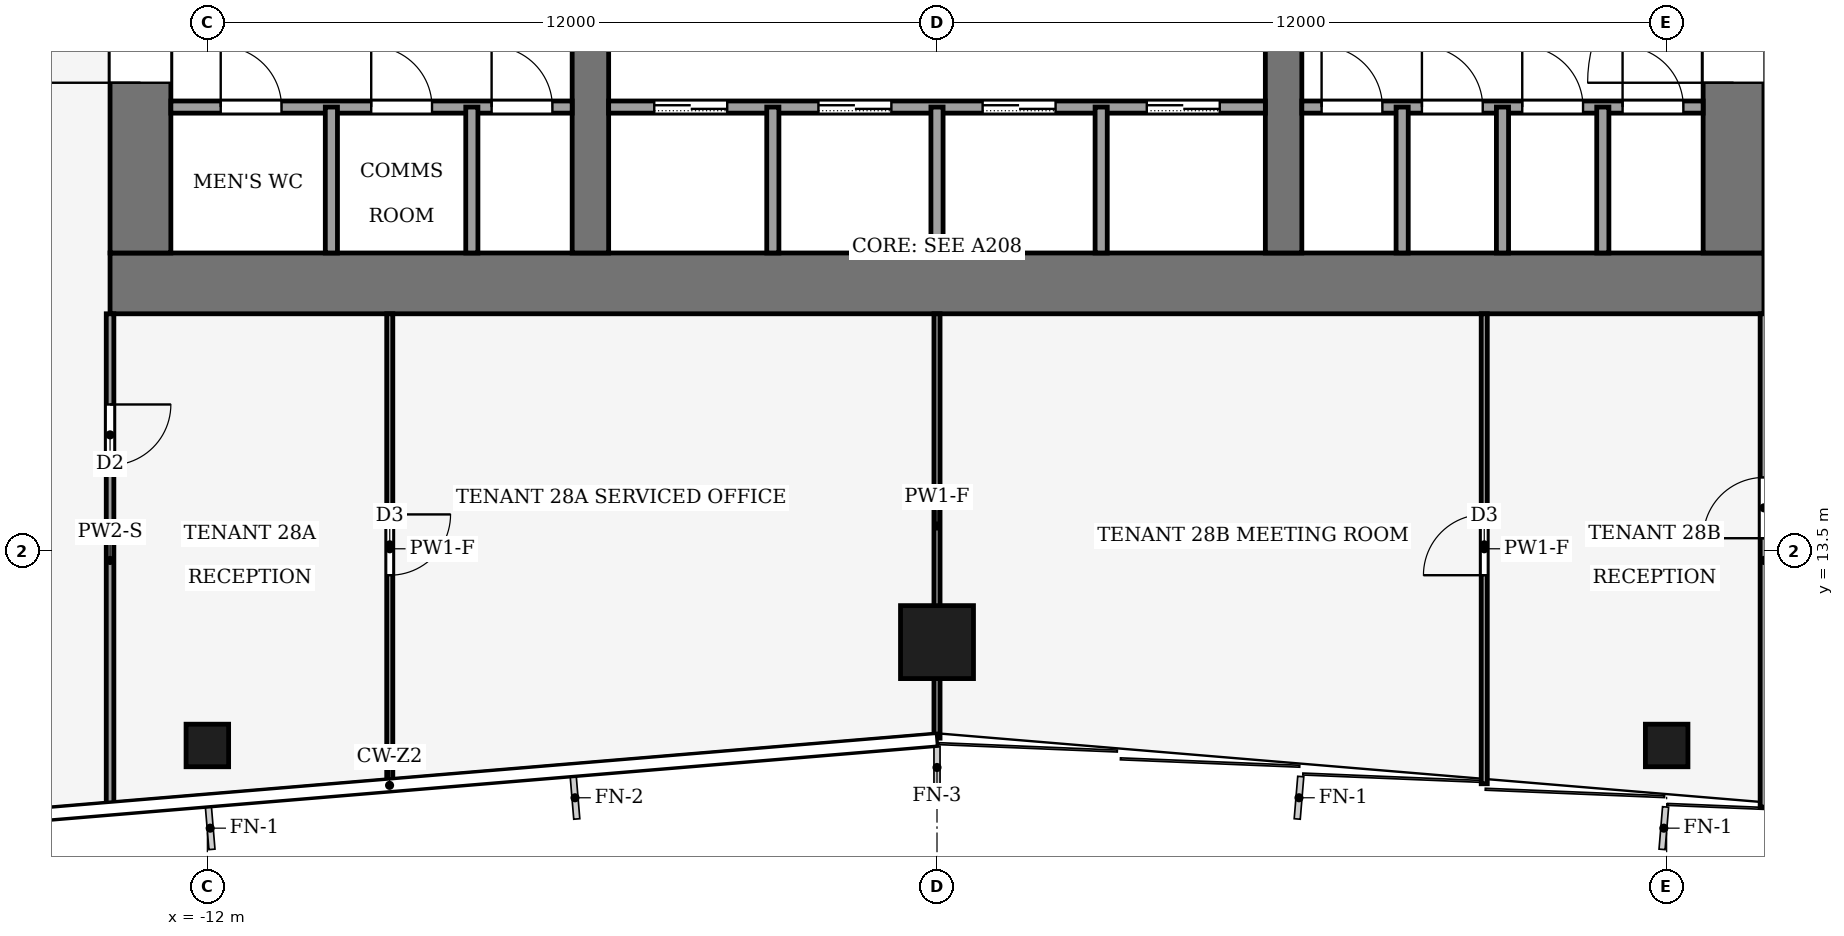
"""IFC4 building model, lengths in metres.
Left out: names, types, materials, properties, quantities, classifications, styles, units other than length and angle.
Written with IfcOpenShell. Run it as: python <this file> out.ifc"""

import sys

from ifc_helpers import new_model, si_unit, direction, frame, frame_2d, origin, origin_2d, place, context, subcontext, project, spatial, rectangle, hollow_rectangle, extrude, element, fill, save


model = new_model("IFC4")
c1 = context("Model", 3, precision=1e-05, world=origin(), true_north=direction((0.0, 1.0)))
c2 = subcontext(c1, "Body", "Model", "MODEL_VIEW")
j1 = project(units=[si_unit("LENGTHUNIT", "METRE"), si_unit("PLANEANGLEUNIT", "RADIAN")], contexts=[c1])
p1 = place(None, origin())
s1 = spatial("IfcSite", under=j1, at=p1, CompositionType="ELEMENT")
p2 = place(p1, origin())
s2 = spatial("IfcBuilding", under=s1, at=p2, CompositionType="ELEMENT")
p3 = place(p2, frame((0.0, 0.0, 126.0)))
s3 = spatial("IfcBuildingStorey", under=s2, at=p3, CompositionType="ELEMENT", Elevation=126.0)
p4 = place(p3, frame((-13.6, 17.9, -0.13), z_axis=(0.0, 0.0, 1.0), x_axis=(1.0, 0.0, 0.0)))
e1 = element("IfcWall", 1, at=p4, inside=s3, PredefinedType="SHEAR", context=c2, shape_type="SweptSolid", body=[
    extrude(rectangle(XDim=27.2, YDim=1.0, at=frame_2d((13.6, 0.0))), origin(), (0.0, 0.0, 1.0), 4.0),
])
p5 = place(p3, frame((-13.1, 18.4, -0.13), z_axis=(0.0, 0.0, 1.0), x_axis=(0.0, 1.0, 0.0)))
e2 = element("IfcWall", 2, at=p5, inside=s3, PredefinedType="SHEAR", context=c2, shape_type="SweptSolid", body=[
    extrude(rectangle(XDim=19.2, YDim=1.0, at=frame_2d((9.6, 0.0))), origin(), (0.0, 0.0, 1.0), 4.0),
])
p6 = place(p5, frame((2.8, 0.0, 0.13)))
e3 = element("IfcOpeningElement", 3, at=p6, cuts=e2, PredefinedType="OPENING", context=c2, shape_type="SweptSolid", body=[
    extrude(rectangle(XDim=2.4, YDim=2.4, at=frame_2d((1.2, 1.2))), frame((0.0, 0.51, 0.0), z_axis=(0.0, -1.0, 0.0), x_axis=(1.0, 0.0, 0.0)), (0.0, 0.0, 1.0), 1.02),
])
p7 = place(p5, frame((13.4, 0.0, 0.13)))
e4 = element("IfcOpeningElement", 4, at=p7, cuts=e2, PredefinedType="OPENING", context=c2, shape_type="SweptSolid", body=[
    extrude(rectangle(XDim=1.4, YDim=2.2, at=frame_2d((0.7, 1.1))), frame((0.0, 0.51, 0.0), z_axis=(0.0, -1.0, 0.0), x_axis=(1.0, 0.0, 0.0)), (0.0, 0.0, 1.0), 1.02),
])
p8 = place(p3, frame((13.1, 18.4, -0.13), z_axis=(0.0, 0.0, 1.0), x_axis=(0.0, 1.0, 0.0)))
e5 = element("IfcWall", 5, at=p8, inside=s3, PredefinedType="SHEAR", context=c2, shape_type="SweptSolid", body=[
    extrude(rectangle(XDim=19.2, YDim=1.0, at=frame_2d((9.6, 0.0))), origin(), (0.0, 0.0, 1.0), 4.0),
])
p9 = place(p8, frame((2.8, 0.0, 0.13)))
e6 = element("IfcOpeningElement", 6, at=p9, cuts=e5, PredefinedType="OPENING", context=c2, shape_type="SweptSolid", body=[
    extrude(rectangle(XDim=2.4, YDim=2.4, at=frame_2d((1.2, 1.2))), frame((0.0, 0.51, 0.0), z_axis=(0.0, -1.0, 0.0), x_axis=(1.0, 0.0, 0.0)), (0.0, 0.0, 1.0), 1.02),
])
p10 = place(p8, frame((13.3, 0.0, 0.13)))
e7 = element("IfcOpeningElement", 7, at=p10, cuts=e5, PredefinedType="OPENING", context=c2, shape_type="SweptSolid", body=[
    extrude(rectangle(XDim=2.4, YDim=2.4, at=frame_2d((1.2, 1.2))), frame((0.0, 0.51, 0.0), z_axis=(0.0, -1.0, 0.0), x_axis=(1.0, 0.0, 0.0)), (0.0, 0.0, 1.0), 1.02),
])
p11 = place(p3, frame((-5.7, 18.4, -0.13), z_axis=(0.0, 0.0, 1.0), x_axis=(0.0, 1.0, 0.0)))
e8 = element("IfcWall", 8, at=p11, inside=s3, PredefinedType="SHEAR", context=c2, shape_type="SweptSolid", body=[
    extrude(rectangle(XDim=19.2, YDim=0.6, at=frame_2d((9.6, 0.0))), origin(), (0.0, 0.0, 1.0), 4.0),
])
p12 = place(p11, frame((8.35, 0.0, 0.13)))
e9 = element("IfcOpeningElement", 9, at=p12, cuts=e8, PredefinedType="OPENING", context=c2, shape_type="SweptSolid", body=[
    extrude(rectangle(XDim=0.9, YDim=2.1, at=frame_2d((0.45, 1.05))), frame((0.0, 0.31, 0.0), z_axis=(0.0, -1.0, 0.0), x_axis=(1.0, 0.0, 0.0)), (0.0, 0.0, 1.0), 0.62),
])
p13 = place(p3, frame((5.7, 18.4, -0.13), z_axis=(0.0, 0.0, 1.0), x_axis=(0.0, 1.0, 0.0)))
e10 = element("IfcWall", 10, at=p13, inside=s3, PredefinedType="SHEAR", context=c2, shape_type="SweptSolid", body=[
    extrude(rectangle(XDim=19.2, YDim=0.6, at=frame_2d((9.6, 0.0))), origin(), (0.0, 0.0, 1.0), 4.0),
])
p14 = place(p13, frame((13.3, 0.0, 0.13)))
e11 = element("IfcOpeningElement", 11, at=p14, cuts=e10, PredefinedType="OPENING", context=c2, shape_type="SweptSolid", body=[
    extrude(rectangle(XDim=2.4, YDim=2.4, at=frame_2d((1.2, 1.2))), frame((0.0, 0.31, 0.0), z_axis=(0.0, -1.0, 0.0), x_axis=(1.0, 0.0, 0.0)), (0.0, 0.0, 1.0), 0.62),
])
p15 = place(p3, frame((0.0, 12.0, 0.0), z_axis=(0.0, 0.0, 1.0), x_axis=(1.0, 0.0, 0.0)))
e12 = element("IfcColumn", 12, at=p15, inside=s3, PredefinedType="COLUMN", context=c2, shape_type="SweptSolid", body=[
    extrude(hollow_rectangle(XDim=1.2, YDim=1.2, WallThickness=0.07, at=origin_2d()), origin(), (0.0, 0.0, 1.0), 4.0),
])
for number, where, z_axis, x_axis in (
    (13, (-12.0, 10.3, 0.0), (0.0, 0.0, 1.0), (1.0, 0.0, 0.0)),
    (14, (12.0, 10.3, 0.0), (0.0, 0.0, 1.0), (1.0, 0.0, 0.0)),
):
    element("IfcColumn", number, at=place(p3, frame(where, z_axis=z_axis, x_axis=x_axis)), inside=s3, PredefinedType="COLUMN", context=c2, shape_type="SweptSolid", body=[
        extrude(hollow_rectangle(XDim=0.7, YDim=0.7, WallThickness=0.03, at=origin_2d()), origin(), (0.0, 0.0, 1.0), 4.0),
    ])
p16 = place(p3, frame((-12.6, 20.8, 0.0), z_axis=(0.0, 0.0, 1.0), x_axis=(1.0, 0.0, 0.0)))
e15 = element("IfcWall", 15, at=p16, inside=s3, PredefinedType="PARTITIONING", context=c2, shape_type="SweptSolid", body=[
    extrude(rectangle(XDim=6.6, YDim=0.2, at=frame_2d((3.3, 0.0))), origin(), (0.0, 0.0, 1.0), 3.87),
])
p17 = place(p16, frame((0.82, 0.0, 0.0)))
e16 = element("IfcOpeningElement", 16, at=p17, cuts=e15, PredefinedType="OPENING", context=c2, shape_type="SweptSolid", body=[
    extrude(rectangle(XDim=1.0, YDim=2.1, at=frame_2d((0.5, 1.05))), frame((0.0, 0.11, 0.0), z_axis=(0.0, -1.0, 0.0), x_axis=(1.0, 0.0, 0.0)), (0.0, 0.0, 1.0), 0.22),
])
p18 = place(p16, frame((3.295, 0.0, 0.0)))
e17 = element("IfcOpeningElement", 17, at=p18, cuts=e15, PredefinedType="OPENING", context=c2, shape_type="SweptSolid", body=[
    extrude(rectangle(XDim=1.0, YDim=2.1, at=frame_2d((0.5, 1.05))), frame((0.0, 0.11, 0.0), z_axis=(0.0, -1.0, 0.0), x_axis=(1.0, 0.0, 0.0)), (0.0, 0.0, 1.0), 0.22),
])
p19 = place(p16, frame((5.275, 0.0, 0.0)))
e18 = element("IfcOpeningElement", 18, at=p19, cuts=e15, PredefinedType="OPENING", context=c2, shape_type="SweptSolid", body=[
    extrude(rectangle(XDim=1.0, YDim=2.1, at=frame_2d((0.5, 1.05))), frame((0.0, 0.11, 0.0), z_axis=(0.0, -1.0, 0.0), x_axis=(1.0, 0.0, 0.0)), (0.0, 0.0, 1.0), 0.22),
])
p20 = place(p3, frame((-5.4, 20.8, 0.0), z_axis=(0.0, 0.0, 1.0), x_axis=(1.0, 0.0, 0.0)))
e19 = element("IfcWall", 19, at=p20, inside=s3, PredefinedType="PARTITIONING", context=c2, shape_type="SweptSolid", body=[
    extrude(rectangle(XDim=10.8, YDim=0.2, at=frame_2d((5.4, 0.0))), origin(), (0.0, 0.0, 1.0), 3.87),
])
p21 = place(p20, frame((0.75, 0.0, 0.0)))
e20 = element("IfcOpeningElement", 20, at=p21, cuts=e19, PredefinedType="OPENING", context=c2, shape_type="SweptSolid", body=[
    extrude(rectangle(XDim=1.2, YDim=2.2, at=frame_2d((0.6, 1.1))), frame((0.0, 0.11, 0.0), z_axis=(0.0, -1.0, 0.0), x_axis=(1.0, 0.0, 0.0)), (0.0, 0.0, 1.0), 0.22),
])
p22 = place(p20, frame((3.45, 0.0, 0.0)))
e21 = element("IfcOpeningElement", 21, at=p22, cuts=e19, PredefinedType="OPENING", context=c2, shape_type="SweptSolid", body=[
    extrude(rectangle(XDim=1.2, YDim=2.2, at=frame_2d((0.6, 1.1))), frame((0.0, 0.11, 0.0), z_axis=(0.0, -1.0, 0.0), x_axis=(1.0, 0.0, 0.0)), (0.0, 0.0, 1.0), 0.22),
])
p23 = place(p20, frame((6.15, 0.0, 0.0)))
e22 = element("IfcOpeningElement", 22, at=p23, cuts=e19, PredefinedType="OPENING", context=c2, shape_type="SweptSolid", body=[
    extrude(rectangle(XDim=1.2, YDim=2.2, at=frame_2d((0.6, 1.1))), frame((0.0, 0.11, 0.0), z_axis=(0.0, -1.0, 0.0), x_axis=(1.0, 0.0, 0.0)), (0.0, 0.0, 1.0), 0.22),
])
p24 = place(p20, frame((8.85, 0.0, 0.0)))
e23 = element("IfcOpeningElement", 23, at=p24, cuts=e19, PredefinedType="OPENING", context=c2, shape_type="SweptSolid", body=[
    extrude(rectangle(XDim=1.2, YDim=2.2, at=frame_2d((0.6, 1.1))), frame((0.0, 0.11, 0.0), z_axis=(0.0, -1.0, 0.0), x_axis=(1.0, 0.0, 0.0)), (0.0, 0.0, 1.0), 0.22),
])
p25 = place(p3, frame((6.0, 20.8, 0.0), z_axis=(0.0, 0.0, 1.0), x_axis=(1.0, 0.0, 0.0)))
e24 = element("IfcWall", 24, at=p25, inside=s3, PredefinedType="PARTITIONING", context=c2, shape_type="SweptSolid", body=[
    extrude(rectangle(XDim=6.6, YDim=0.2, at=frame_2d((3.3, 0.0))), origin(), (0.0, 0.0, 1.0), 3.87),
])
p26 = place(p25, frame((0.325, 0.0, 0.0)))
e25 = element("IfcOpeningElement", 25, at=p26, cuts=e24, PredefinedType="OPENING", context=c2, shape_type="SweptSolid", body=[
    extrude(rectangle(XDim=1.0, YDim=2.1, at=frame_2d((0.5, 1.05))), frame((0.0, 0.11, 0.0), z_axis=(0.0, -1.0, 0.0), x_axis=(1.0, 0.0, 0.0)), (0.0, 0.0, 1.0), 0.22),
])
p27 = place(p25, frame((1.975, 0.0, 0.0)))
e26 = element("IfcOpeningElement", 26, at=p27, cuts=e24, PredefinedType="OPENING", context=c2, shape_type="SweptSolid", body=[
    extrude(rectangle(XDim=1.0, YDim=2.1, at=frame_2d((0.5, 1.05))), frame((0.0, 0.11, 0.0), z_axis=(0.0, -1.0, 0.0), x_axis=(1.0, 0.0, 0.0)), (0.0, 0.0, 1.0), 0.22),
])
p28 = place(p25, frame((3.625, 0.0, 0.0)))
e27 = element("IfcOpeningElement", 27, at=p28, cuts=e24, PredefinedType="OPENING", context=c2, shape_type="SweptSolid", body=[
    extrude(rectangle(XDim=1.0, YDim=2.1, at=frame_2d((0.5, 1.05))), frame((0.0, 0.11, 0.0), z_axis=(0.0, -1.0, 0.0), x_axis=(1.0, 0.0, 0.0)), (0.0, 0.0, 1.0), 0.22),
])
p29 = place(p25, frame((5.275, 0.0, 0.0)))
e28 = element("IfcOpeningElement", 28, at=p29, cuts=e24, PredefinedType="OPENING", context=c2, shape_type="SweptSolid", body=[
    extrude(rectangle(XDim=1.0, YDim=2.1, at=frame_2d((0.5, 1.05))), frame((0.0, 0.11, 0.0), z_axis=(0.0, -1.0, 0.0), x_axis=(1.0, 0.0, 0.0)), (0.0, 0.0, 1.0), 0.22),
])
for number, where, z_axis, x_axis in (
    (29, (-9.96, 18.4, 0.0), (0.0, 0.0, 1.0), (0.0, 1.0, 0.0)),
    (30, (-7.65, 18.4, 0.0), (0.0, 0.0, 1.0), (0.0, 1.0, 0.0)),
    (31, (-2.7, 18.4, 0.0), (0.0, 0.0, 1.0), (0.0, 1.0, 0.0)),
    (32, (0.0, 18.4, 0.0), (0.0, 0.0, 1.0), (0.0, 1.0, 0.0)),
    (33, (2.7, 18.4, 0.0), (0.0, 0.0, 1.0), (0.0, 1.0, 0.0)),
    (34, (7.65, 18.4, 0.0), (0.0, 0.0, 1.0), (0.0, 1.0, 0.0)),
    (35, (9.3, 18.4, 0.0), (0.0, 0.0, 1.0), (0.0, 1.0, 0.0)),
    (36, (10.95, 18.4, 0.0), (0.0, 0.0, 1.0), (0.0, 1.0, 0.0)),
):
    element("IfcWall", number, at=place(p3, frame(where, z_axis=z_axis, x_axis=x_axis)), inside=s3, PredefinedType="PARTITIONING", context=c2, shape_type="SweptSolid", body=[
        extrude(rectangle(XDim=2.4, YDim=0.2, at=frame_2d((1.2, 0.0))), origin(), (0.0, 0.0, 1.0), 3.87),
    ])
p30 = place(p3, frame((-13.6, 17.4, 0.0), z_axis=(0.0, 0.0, 1.0), x_axis=(0.0, -1.0, 0.0)))
e37 = element("IfcWall", 37, at=p30, inside=s3, PredefinedType="PARTITIONING", context=c2, shape_type="SweptSolid", body=[
    extrude(rectangle(XDim=8.113, YDim=0.125, at=frame_2d((4.057, 0.0))), origin(), (0.0, 0.0, 1.0), 3.04),
])
p31 = place(p30, frame((1.492, 0.0, 0.0)))
e38 = element("IfcOpeningElement", 38, at=p31, cuts=e37, PredefinedType="OPENING", context=c2, shape_type="SweptSolid", body=[
    extrude(rectangle(XDim=1.0, YDim=2.1, at=frame_2d((0.5, 1.05))), frame((0.0, 0.073, 0.0), z_axis=(0.0, -1.0, 0.0), x_axis=(1.0, 0.0, 0.0)), (0.0, 0.0, 1.0), 0.145),
])
p32 = place(p3, frame((13.6, 9.287, 0.0), z_axis=(0.0, 0.0, 1.0), x_axis=(0.0, 1.0, 0.0)))
e39 = element("IfcWall", 39, at=p32, inside=s3, PredefinedType="PARTITIONING", context=c2, shape_type="SweptSolid", body=[
    extrude(rectangle(XDim=8.113, YDim=0.125, at=frame_2d((4.057, 0.0))), origin(), (0.0, 0.0, 1.0), 3.04),
])
p33 = place(p32, frame((4.422, 0.0, 0.0)))
e40 = element("IfcOpeningElement", 40, at=p33, cuts=e39, PredefinedType="OPENING", context=c2, shape_type="SweptSolid", body=[
    extrude(rectangle(XDim=1.0, YDim=2.1, at=frame_2d((0.5, 1.05))), frame((0.0, 0.073, 0.0), z_axis=(0.0, -1.0, 0.0), x_axis=(1.0, 0.0, 0.0)), (0.0, 0.0, 1.0), 0.145),
])
p34 = place(p3, frame((-9.0, 17.4, 0.0), z_axis=(0.0, 0.0, 1.0), x_axis=(0.0, -1.0, 0.0)))
e41 = element("IfcWall", 41, at=p34, inside=s3, PredefinedType="PARTITIONING", context=c2, shape_type="SweptSolid", body=[
    extrude(rectangle(XDim=7.73, YDim=0.1, at=frame_2d((3.865, 0.0))), origin(), (0.0, 0.0, 1.0), 3.04),
])
p35 = place(p34, frame((3.3, 0.0, 0.0)))
e42 = element("IfcOpeningElement", 42, at=p35, cuts=e41, PredefinedType="OPENING", context=c2, shape_type="SweptSolid", body=[
    extrude(rectangle(XDim=1.0, YDim=2.1, at=frame_2d((0.5, 1.05))), frame((0.0, 0.06, 0.0), z_axis=(0.0, -1.0, 0.0), x_axis=(1.0, 0.0, 0.0)), (0.0, 0.0, 1.0), 0.12),
])
p36 = place(p3, frame((0.0, 10.42, 0.0), z_axis=(0.0, 0.0, 1.0), x_axis=(0.0, 1.0, 0.0)))
e43 = element("IfcWall", 43, at=p36, inside=s3, PredefinedType="PARTITIONING", context=c2, shape_type="SweptSolid", body=[
    extrude(rectangle(XDim=6.98, YDim=0.1, at=frame_2d((3.49, 0.0))), origin(), (0.0, 0.0, 1.0), 3.04),
])
p37 = place(p3, frame((9.0, 9.67, 0.0), z_axis=(0.0, 0.0, 1.0), x_axis=(0.0, 1.0, 0.0)))
e44 = element("IfcWall", 44, at=p37, inside=s3, PredefinedType="PARTITIONING", context=c2, shape_type="SweptSolid", body=[
    extrude(rectangle(XDim=7.73, YDim=0.1, at=frame_2d((3.865, 0.0))), origin(), (0.0, 0.0, 1.0), 3.04),
])
p38 = place(p37, frame((3.43, 0.0, 0.0)))
e45 = element("IfcOpeningElement", 45, at=p38, cuts=e44, PredefinedType="OPENING", context=c2, shape_type="SweptSolid", body=[
    extrude(rectangle(XDim=1.0, YDim=2.1, at=frame_2d((0.5, 1.05))), frame((0.0, 0.06, 0.0), z_axis=(0.0, -1.0, 0.0), x_axis=(1.0, 0.0, 0.0)), (0.0, 0.0, 1.0), 0.12),
])
p39 = place(p21, origin())
e46 = element("IfcDoor", 46, at=p39, inside=s3, OperationType="SLIDING_TO_LEFT", PredefinedType="DOOR", context=c2, shape_type="SweptSolid", body=[
    extrude(rectangle(XDim=1.2, YDim=2.2, at=frame_2d((0.6, 1.1))), frame((0.0, 0.025, 0.0), z_axis=(0.0, -1.0, 0.0), x_axis=(1.0, 0.0, 0.0)), (0.0, 0.0, 1.0), 0.05),
])
fill(e20, e46)
p40 = place(p22, origin())
e47 = element("IfcDoor", 47, at=p40, inside=s3, OperationType="SLIDING_TO_LEFT", PredefinedType="DOOR", context=c2, shape_type="SweptSolid", body=[
    extrude(rectangle(XDim=1.2, YDim=2.2, at=frame_2d((0.6, 1.1))), frame((0.0, 0.025, 0.0), z_axis=(0.0, -1.0, 0.0), x_axis=(1.0, 0.0, 0.0)), (0.0, 0.0, 1.0), 0.05),
])
fill(e21, e47)
p41 = place(p23, origin())
e48 = element("IfcDoor", 48, at=p41, inside=s3, OperationType="SLIDING_TO_LEFT", PredefinedType="DOOR", context=c2, shape_type="SweptSolid", body=[
    extrude(rectangle(XDim=1.2, YDim=2.2, at=frame_2d((0.6, 1.1))), frame((0.0, 0.025, 0.0), z_axis=(0.0, -1.0, 0.0), x_axis=(1.0, 0.0, 0.0)), (0.0, 0.0, 1.0), 0.05),
])
fill(e22, e48)
p42 = place(p24, origin())
e49 = element("IfcDoor", 49, at=p42, inside=s3, OperationType="SLIDING_TO_LEFT", PredefinedType="DOOR", context=c2, shape_type="SweptSolid", body=[
    extrude(rectangle(XDim=1.2, YDim=2.2, at=frame_2d((0.6, 1.1))), frame((0.0, 0.025, 0.0), z_axis=(0.0, -1.0, 0.0), x_axis=(1.0, 0.0, 0.0)), (0.0, 0.0, 1.0), 0.05),
])
fill(e23, e49)
p43 = place(p17, origin())
e50 = element("IfcDoor", 50, at=p43, inside=s3, OperationType="SINGLE_SWING_LEFT", PredefinedType="DOOR", context=c2, shape_type="SweptSolid", body=[
    extrude(rectangle(XDim=1.0, YDim=2.1, at=frame_2d((0.5, 1.05))), frame((0.0, 0.025, 0.0), z_axis=(0.0, -1.0, 0.0), x_axis=(1.0, 0.0, 0.0)), (0.0, 0.0, 1.0), 0.05),
])
fill(e16, e50)
p44 = place(p18, origin())
e51 = element("IfcDoor", 51, at=p44, inside=s3, OperationType="SINGLE_SWING_LEFT", PredefinedType="DOOR", context=c2, shape_type="SweptSolid", body=[
    extrude(rectangle(XDim=1.0, YDim=2.1, at=frame_2d((0.5, 1.05))), frame((0.0, 0.025, 0.0), z_axis=(0.0, -1.0, 0.0), x_axis=(1.0, 0.0, 0.0)), (0.0, 0.0, 1.0), 0.05),
])
fill(e17, e51)
p45 = place(p19, origin())
e52 = element("IfcDoor", 52, at=p45, inside=s3, OperationType="SINGLE_SWING_RIGHT", PredefinedType="DOOR", context=c2, shape_type="SweptSolid", body=[
    extrude(rectangle(XDim=1.0, YDim=2.1, at=frame_2d((0.5, 1.05))), frame((0.0, 0.025, 0.0), z_axis=(0.0, -1.0, 0.0), x_axis=(1.0, 0.0, 0.0)), (0.0, 0.0, 1.0), 0.05),
])
fill(e18, e52)
p46 = place(p26, origin())
e53 = element("IfcDoor", 53, at=p46, inside=s3, OperationType="SINGLE_SWING_LEFT", PredefinedType="DOOR", context=c2, shape_type="SweptSolid", body=[
    extrude(rectangle(XDim=1.0, YDim=2.1, at=frame_2d((0.5, 1.05))), frame((0.0, 0.025, 0.0), z_axis=(0.0, -1.0, 0.0), x_axis=(1.0, 0.0, 0.0)), (0.0, 0.0, 1.0), 0.05),
])
fill(e25, e53)
p47 = place(p27, origin())
e54 = element("IfcDoor", 54, at=p47, inside=s3, OperationType="SINGLE_SWING_LEFT", PredefinedType="DOOR", context=c2, shape_type="SweptSolid", body=[
    extrude(rectangle(XDim=1.0, YDim=2.1, at=frame_2d((0.5, 1.05))), frame((0.0, 0.025, 0.0), z_axis=(0.0, -1.0, 0.0), x_axis=(1.0, 0.0, 0.0)), (0.0, 0.0, 1.0), 0.05),
])
fill(e26, e54)
p48 = place(p28, origin())
e55 = element("IfcDoor", 55, at=p48, inside=s3, OperationType="SINGLE_SWING_RIGHT", PredefinedType="DOOR", context=c2, shape_type="SweptSolid", body=[
    extrude(rectangle(XDim=1.0, YDim=2.1, at=frame_2d((0.5, 1.05))), frame((0.0, 0.025, 0.0), z_axis=(0.0, -1.0, 0.0), x_axis=(1.0, 0.0, 0.0)), (0.0, 0.0, 1.0), 0.05),
])
fill(e27, e55)
p49 = place(p29, origin())
e56 = element("IfcDoor", 56, at=p49, inside=s3, OperationType="SINGLE_SWING_RIGHT", PredefinedType="DOOR", context=c2, shape_type="SweptSolid", body=[
    extrude(rectangle(XDim=1.0, YDim=2.1, at=frame_2d((0.5, 1.05))), frame((0.0, 0.025, 0.0), z_axis=(0.0, -1.0, 0.0), x_axis=(1.0, 0.0, 0.0)), (0.0, 0.0, 1.0), 0.05),
])
fill(e28, e56)
p50 = place(p6, origin())
e57 = element("IfcDoor", 57, at=p50, inside=s3, OperationType="DOUBLE_DOOR_SINGLE_SWING", PredefinedType="DOOR", context=c2, shape_type="SweptSolid", body=[
    extrude(rectangle(XDim=2.4, YDim=2.4, at=frame_2d((1.2, 1.2))), frame((0.0, 0.025, 0.0), z_axis=(0.0, -1.0, 0.0), x_axis=(1.0, 0.0, 0.0)), (0.0, 0.0, 1.0), 0.05),
])
fill(e3, e57)
p51 = place(p9, origin())
e58 = element("IfcDoor", 58, at=p51, inside=s3, OperationType="DOUBLE_DOOR_SINGLE_SWING", PredefinedType="DOOR", context=c2, shape_type="SweptSolid", body=[
    extrude(rectangle(XDim=2.4, YDim=2.4, at=frame_2d((1.2, 1.2))), frame((0.0, 0.025, 0.0), z_axis=(0.0, -1.0, 0.0), x_axis=(1.0, 0.0, 0.0)), (0.0, 0.0, 1.0), 0.05),
])
fill(e6, e58)
p52 = place(p31, origin())
e59 = element("IfcDoor", 59, at=p52, inside=s3, OperationType="SINGLE_SWING_LEFT", PredefinedType="DOOR", context=c2, shape_type="SweptSolid", body=[
    extrude(rectangle(XDim=1.0, YDim=2.1, at=frame_2d((0.5, 1.05))), frame((0.0, 0.025, 0.0), z_axis=(0.0, -1.0, 0.0), x_axis=(1.0, 0.0, 0.0)), (0.0, 0.0, 1.0), 0.05),
])
fill(e38, e59)
p53 = place(p33, origin())
e60 = element("IfcDoor", 60, at=p53, inside=s3, OperationType="SINGLE_SWING_RIGHT", PredefinedType="DOOR", context=c2, shape_type="SweptSolid", body=[
    extrude(rectangle(XDim=1.0, YDim=2.1, at=frame_2d((0.5, 1.05))), frame((0.0, 0.025, 0.0), z_axis=(0.0, -1.0, 0.0), x_axis=(1.0, 0.0, 0.0)), (0.0, 0.0, 1.0), 0.05),
])
fill(e40, e60)
p54 = place(p35, origin())
e61 = element("IfcDoor", 61, at=p54, inside=s3, OperationType="SINGLE_SWING_LEFT", PredefinedType="DOOR", context=c2, shape_type="SweptSolid", body=[
    extrude(rectangle(XDim=1.0, YDim=2.1, at=frame_2d((0.5, 1.05))), frame((0.0, 0.025, 0.0), z_axis=(0.0, -1.0, 0.0), x_axis=(1.0, 0.0, 0.0)), (0.0, 0.0, 1.0), 0.05),
])
fill(e42, e61)
p55 = place(p38, origin())
e62 = element("IfcDoor", 62, at=p55, inside=s3, OperationType="SINGLE_SWING_RIGHT", PredefinedType="DOOR", context=c2, shape_type="SweptSolid", body=[
    extrude(rectangle(XDim=1.0, YDim=2.1, at=frame_2d((0.5, 1.05))), frame((0.0, 0.025, 0.0), z_axis=(0.0, -1.0, 0.0), x_axis=(1.0, 0.0, 0.0)), (0.0, 0.0, 1.0), 0.05),
])
fill(e45, e62)
save(model, sys.argv[1])
